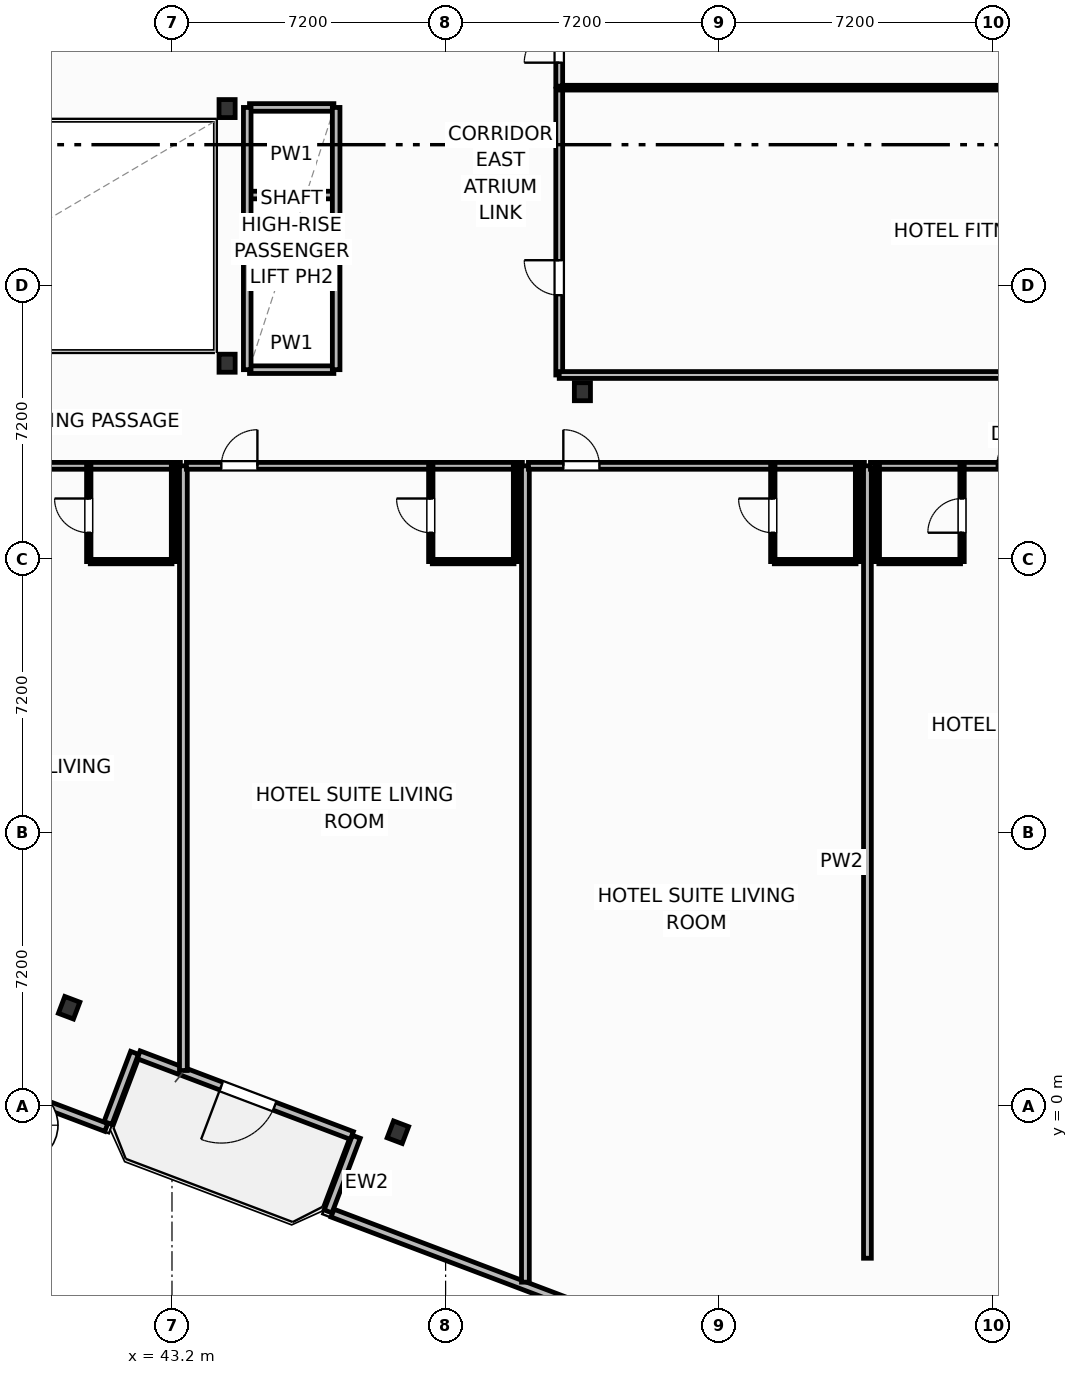
"""IFC4 building model, lengths in metres.
Left out: names, types, materials, properties, quantities, classifications, styles, units other than length and angle.
Written with IfcOpenShell. Run it as: python <this file> out.ifc"""

import sys

from ifc_helpers import new_model, si_unit, direction, frame, frame_2d, origin, origin_2d, place, context, subcontext, project, spatial, rectangle, i_section, extrude, element, fill, save


model = new_model("IFC4")
c1 = context("Model", 3, precision=1e-05, world=origin(), true_north=direction((0.0, 1.0)))
c2 = subcontext(c1, "Body", "Model", "MODEL_VIEW")
j1 = project(units=[si_unit("LENGTHUNIT", "METRE"), si_unit("PLANEANGLEUNIT", "RADIAN")], contexts=[c1])
p1 = place(None, origin())
s1 = spatial("IfcSite", under=j1, at=p1, CompositionType="ELEMENT")
p2 = place(p1, origin())
s2 = spatial("IfcBuilding", under=s1, at=p2, CompositionType="ELEMENT")
p3 = place(p2, frame((0.0, 0.0, 83.6)))
s3 = spatial("IfcBuildingStorey", under=s2, at=p3, CompositionType="ELEMENT", Elevation=83.6)
for number, where, z_axis, x_axis in (
    (1, (44.65, 19.55, 0.0), (0.0, 0.0, 1.0), (1.0, 0.0, 0.0)),
    (2, (44.65, 26.25, 0.0), (0.0, 0.0, 1.0), (1.0, 0.0, 0.0)),
    (3, (54.0, 18.8, 0.0), (0.0, 0.0, 1.0), (1.0, 0.0, 0.0)),
    (4, (40.493, 2.591, 0.0), (0.0, 0.0, 1.0), (0.935, -0.354, 0.0)),
    (5, (49.144, -0.684, 0.0), (0.0, 0.0, 1.0), (0.935, -0.354, 0.0)),
):
    element("IfcColumn", number, at=place(p3, frame(where, z_axis=z_axis, x_axis=x_axis)), inside=s3, PredefinedType="COLUMN", context=c2, shape_type="SweptSolid", body=[
        extrude(i_section(OverallWidth=0.424, OverallDepth=0.474, WebThickness=0.048, FlangeThickness=0.077, FilletRadius=0.025, at=origin_2d()), origin(), (0.0, 0.0, 1.0), 3.7),
    ])
p4 = place(p3, frame((47.935, -0.771, 0.0), z_axis=(0.0, 0.0, 1.0), x_axis=(-0.935227640088, 0.354046976001, 0.0)))
e6 = element("IfcWall", 6, at=p4, inside=s3, PredefinedType="SOLIDWALL", context=c2, shape_type="SweptSolid", body=[
    extrude(rectangle(XDim=6.0, YDim=0.22, at=frame_2d((3.0, 0.0))), origin(), (0.0, 0.0, 1.0), 2.73),
])
p5 = place(p4, frame((2.176, 0.0, 0.0)))
e7 = element("IfcOpeningElement", 7, at=p5, cuts=e6, PredefinedType="OPENING", context=c2, shape_type="SweptSolid", body=[
    extrude(rectangle(XDim=1.5, YDim=2.25, at=frame_2d((0.75, 1.125))), frame((0.0, 0.12, 0.0), z_axis=(0.0, -1.0, 0.0), x_axis=(1.0, 0.0, 0.0)), (0.0, 0.0, 1.0), 0.24),
])
p6 = place(p3, frame((33.957, 2.286, 0.0), z_axis=(0.0, 0.0, 1.0), x_axis=(0.935220736163, -0.354065212427, 0.0)))
e8 = element("IfcWall", 8, at=p6, inside=s3, PredefinedType="SOLIDWALL", context=c2, shape_type="SweptSolid", body=[
    extrude(rectangle(XDim=8.035, YDim=0.22, at=frame_2d((4.018, 0.0))), origin(), (0.0, 0.0, 1.0), 2.73),
])
p7 = place(p6, frame((3.192, 0.0, 0.8)))
e9 = element("IfcOpeningElement", 9, at=p7, cuts=e8, PredefinedType="OPENING", context=c2, shape_type="SweptSolid", body=[
    extrude(rectangle(XDim=1.65, YDim=1.65, at=frame_2d((0.825, 0.825))), frame((0.0, 0.12, 0.0), z_axis=(0.0, -1.0, 0.0), x_axis=(1.0, 0.0, 0.0)), (0.0, 0.0, 1.0), 0.24),
])
p8 = place(p3, frame((41.516, -0.442, 0.0), z_axis=(0.0, 0.0, 1.0), x_axis=(0.354061611705, 0.935222099352, 0.0)))
e10 = element("IfcWall", 10, at=p8, inside=s3, PredefinedType="SOLIDWALL", context=c2, shape_type="SweptSolid", body=[
    extrude(rectangle(XDim=1.975, YDim=0.22, at=frame_2d((0.987, 0.0))), origin(), (0.0, 0.0, 1.0), 2.73),
])
p9 = place(p3, frame((48.051, -0.805, 0.0), z_axis=(0.0, 0.0, 1.0), x_axis=(-0.353988291547, -0.935249854022, 0.0)))
e11 = element("IfcWall", 11, at=p9, inside=s3, PredefinedType="SOLIDWALL", context=c2, shape_type="SweptSolid", body=[
    extrude(rectangle(XDim=2.1, YDim=0.22, at=frame_2d((1.05, 0.0))), origin(), (0.0, 0.0, 1.0), 2.73),
])
p10 = place(p3, frame((47.424, -2.813, 0.0), z_axis=(0.0, 0.0, 1.0), x_axis=(0.935225962032, -0.354051408614, 0.0)))
e12 = element("IfcWall", 12, at=p10, inside=s3, PredefinedType="SOLIDWALL", context=c2, shape_type="SweptSolid", body=[
    extrude(rectangle(XDim=14.347, YDim=0.22, at=frame_2d((7.173, 0.0))), origin(), (0.0, 0.0, 1.0), 2.73),
])
p11 = place(p10, frame((6.348, 0.0, 0.8)))
e13 = element("IfcOpeningElement", 13, at=p11, cuts=e12, PredefinedType="OPENING", context=c2, shape_type="SweptSolid", body=[
    extrude(rectangle(XDim=1.65, YDim=1.65, at=frame_2d((0.825, 0.825))), frame((0.0, 0.12, 0.0), z_axis=(0.0, -1.0, 0.0), x_axis=(1.0, 0.0, 0.0)), (0.0, 0.0, 1.0), 0.24),
])
p12 = place(p3, frame((34.58, 16.85, 0.0), z_axis=(0.0, 0.0, 1.0), x_axis=(1.0, 0.0, 0.0)))
e14 = element("IfcWall", 14, at=p12, inside=s3, PredefinedType="PARTITIONING", context=c2, shape_type="SweptSolid", body=[
    extrude(rectangle(XDim=8.84, YDim=0.18, at=frame_2d((4.42, 0.0))), origin(), (0.0, 0.0, 1.0), 3.45),
])
p13 = place(p12, frame((0.918, 0.0, 0.0)))
e15 = element("IfcOpeningElement", 15, at=p13, cuts=e14, PredefinedType="OPENING", context=c2, shape_type="SweptSolid", body=[
    extrude(rectangle(XDim=0.95, YDim=2.15, at=frame_2d((0.475, 1.075))), frame((0.0, 0.1, 0.0), z_axis=(0.0, -1.0, 0.0), x_axis=(1.0, 0.0, 0.0)), (0.0, 0.0, 1.0), 0.2),
])
p14 = place(p3, frame((41.05, 14.33, 0.0), z_axis=(0.0, 0.0, 1.0), x_axis=(1.0, 0.0, 0.0)))
e16 = element("IfcWall", 16, at=p14, inside=s3, PredefinedType="PARTITIONING", context=c2, shape_type="SweptSolid", body=[
    extrude(rectangle(XDim=2.15, YDim=0.115, at=frame_2d((1.075, 0.0))), origin(), (0.0, 0.0, 1.0), 3.45),
])
p15 = place(p3, frame((41.01, 14.33, 0.0), z_axis=(0.0, 0.0, 1.0), x_axis=(0.0, 1.0, 0.0)))
e17 = element("IfcWall", 17, at=p15, inside=s3, PredefinedType="PARTITIONING", context=c2, shape_type="SweptSolid", body=[
    extrude(rectangle(XDim=2.52, YDim=0.115, at=frame_2d((1.26, 0.0))), origin(), (0.0, 0.0, 1.0), 3.45),
])
p16 = place(p15, frame((0.76, 0.0, 0.0)))
e18 = element("IfcOpeningElement", 18, at=p16, cuts=e17, PredefinedType="OPENING", context=c2, shape_type="SweptSolid", body=[
    extrude(rectangle(XDim=0.9, YDim=2.05, at=frame_2d((0.45, 1.025))), frame((0.0, 0.067, 0.0), z_axis=(0.0, -1.0, 0.0), x_axis=(1.0, 0.0, 0.0)), (0.0, 0.0, 1.0), 0.135),
])
p17 = place(p3, frame((43.24, 14.33, 0.0), z_axis=(0.0, 0.0, 1.0), x_axis=(0.0, 1.0, 0.0)))
e19 = element("IfcWall", 19, at=p17, inside=s3, PredefinedType="PARTITIONING", context=c2, shape_type="SweptSolid", body=[
    extrude(rectangle(XDim=2.52, YDim=0.115, at=frame_2d((1.26, 0.0))), origin(), (0.0, 0.0, 1.0), 2.58),
])
p18 = place(p3, frame((43.5, 0.939, 0.0), z_axis=(0.0, 0.0, 1.0), x_axis=(0.0, 1.0, 0.0)))
e20 = element("IfcWall", 20, at=p18, inside=s3, PredefinedType="PARTITIONING", context=c2, shape_type="SweptSolid", body=[
    extrude(rectangle(XDim=15.911, YDim=0.205, at=frame_2d((7.955, 0.0))), origin(), (0.0, 0.0, 1.0), 2.58),
])
p19 = place(p3, frame((43.58, 16.85, 0.0), z_axis=(0.0, 0.0, 1.0), x_axis=(1.0, 0.0, 0.0)))
e21 = element("IfcWall", 21, at=p19, inside=s3, PredefinedType="PARTITIONING", context=c2, shape_type="SweptSolid", body=[
    extrude(rectangle(XDim=8.84, YDim=0.18, at=frame_2d((4.42, 0.0))), origin(), (0.0, 0.0, 1.0), 3.45),
])
p20 = place(p19, frame((0.918, 0.0, 0.0)))
e22 = element("IfcOpeningElement", 22, at=p20, cuts=e21, PredefinedType="OPENING", context=c2, shape_type="SweptSolid", body=[
    extrude(rectangle(XDim=0.95, YDim=2.15, at=frame_2d((0.475, 1.075))), frame((0.0, 0.1, 0.0), z_axis=(0.0, -1.0, 0.0), x_axis=(1.0, 0.0, 0.0)), (0.0, 0.0, 1.0), 0.2),
])
p21 = place(p3, frame((50.05, 14.33, 0.0), z_axis=(0.0, 0.0, 1.0), x_axis=(1.0, 0.0, 0.0)))
e23 = element("IfcWall", 23, at=p21, inside=s3, PredefinedType="PARTITIONING", context=c2, shape_type="SweptSolid", body=[
    extrude(rectangle(XDim=2.15, YDim=0.115, at=frame_2d((1.075, 0.0))), origin(), (0.0, 0.0, 1.0), 3.45),
])
p22 = place(p3, frame((50.01, 14.33, 0.0), z_axis=(0.0, 0.0, 1.0), x_axis=(0.0, 1.0, 0.0)))
e24 = element("IfcWall", 24, at=p22, inside=s3, PredefinedType="PARTITIONING", context=c2, shape_type="SweptSolid", body=[
    extrude(rectangle(XDim=2.52, YDim=0.115, at=frame_2d((1.26, 0.0))), origin(), (0.0, 0.0, 1.0), 3.45),
])
p23 = place(p22, frame((0.76, 0.0, 0.0)))
e25 = element("IfcOpeningElement", 25, at=p23, cuts=e24, PredefinedType="OPENING", context=c2, shape_type="SweptSolid", body=[
    extrude(rectangle(XDim=0.9, YDim=2.05, at=frame_2d((0.45, 1.025))), frame((0.0, 0.067, 0.0), z_axis=(0.0, -1.0, 0.0), x_axis=(1.0, 0.0, 0.0)), (0.0, 0.0, 1.0), 0.135),
])
p24 = place(p3, frame((52.24, 14.33, 0.0), z_axis=(0.0, 0.0, 1.0), x_axis=(0.0, 1.0, 0.0)))
e26 = element("IfcWall", 26, at=p24, inside=s3, PredefinedType="PARTITIONING", context=c2, shape_type="SweptSolid", body=[
    extrude(rectangle(XDim=2.52, YDim=0.115, at=frame_2d((1.26, 0.0))), origin(), (0.0, 0.0, 1.0), 3.45),
])
p25 = place(p3, frame((52.5, -4.63, 0.0), z_axis=(0.0, 0.0, 1.0), x_axis=(0.0, 1.0, 0.0)))
e27 = element("IfcWall", 27, at=p25, inside=s3, PredefinedType="PARTITIONING", context=c2, shape_type="SweptSolid", body=[
    extrude(rectangle(XDim=21.48, YDim=0.205, at=frame_2d((10.74, 0.0))), origin(), (0.0, 0.0, 1.0), 2.58),
])
p26 = place(p3, frame((52.58, 16.85, 0.0), z_axis=(0.0, 0.0, 1.0), x_axis=(1.0, 0.0, 0.0)))
e28 = element("IfcWall", 28, at=p26, inside=s3, PredefinedType="PARTITIONING", context=c2, shape_type="SweptSolid", body=[
    extrude(rectangle(XDim=8.84, YDim=0.18, at=frame_2d((4.42, 0.0))), origin(), (0.0, 0.0, 1.0), 2.58),
])
p27 = place(p26, frame((0.918, 0.0, 0.0)))
e29 = element("IfcOpeningElement", 29, at=p27, cuts=e28, PredefinedType="OPENING", context=c2, shape_type="SweptSolid", body=[
    extrude(rectangle(XDim=0.95, YDim=2.15, at=frame_2d((0.475, 1.075))), frame((0.0, 0.1, 0.0), z_axis=(0.0, -1.0, 0.0), x_axis=(1.0, 0.0, 0.0)), (0.0, 0.0, 1.0), 0.2),
])
p28 = place(p3, frame((59.05, 14.33, 0.0), z_axis=(0.0, 0.0, 1.0), x_axis=(1.0, 0.0, 0.0)))
e30 = element("IfcWall", 30, at=p28, inside=s3, PredefinedType="PARTITIONING", context=c2, shape_type="SweptSolid", body=[
    extrude(rectangle(XDim=2.15, YDim=0.115, at=frame_2d((1.075, 0.0))), origin(), (0.0, 0.0, 1.0), 3.45),
])
p29 = place(p3, frame((59.01, 14.33, 0.0), z_axis=(0.0, 0.0, 1.0), x_axis=(0.0, 1.0, 0.0)))
e31 = element("IfcWall", 31, at=p29, inside=s3, PredefinedType="PARTITIONING", context=c2, shape_type="SweptSolid", body=[
    extrude(rectangle(XDim=2.52, YDim=0.115, at=frame_2d((1.26, 0.0))), origin(), (0.0, 0.0, 1.0), 3.45),
])
p30 = place(p29, frame((0.76, 0.0, 0.0)))
e32 = element("IfcOpeningElement", 32, at=p30, cuts=e31, PredefinedType="OPENING", context=c2, shape_type="SweptSolid", body=[
    extrude(rectangle(XDim=0.9, YDim=2.05, at=frame_2d((0.45, 1.025))), frame((0.0, 0.067, 0.0), z_axis=(0.0, -1.0, 0.0), x_axis=(1.0, 0.0, 0.0)), (0.0, 0.0, 1.0), 0.135),
])
p31 = place(p3, frame((61.24, 14.33, 0.0), z_axis=(0.0, 0.0, 1.0), x_axis=(0.0, 1.0, 0.0)))
e33 = element("IfcWall", 33, at=p31, inside=s3, PredefinedType="PARTITIONING", context=c2, shape_type="SweptSolid", body=[
    extrude(rectangle(XDim=2.52, YDim=0.115, at=frame_2d((1.26, 0.0))), origin(), (0.0, 0.0, 1.0), 3.45),
])
p32 = place(p3, frame((61.5, -4.0, 0.0), z_axis=(0.0, 0.0, 1.0), x_axis=(0.0, 1.0, 0.0)))
e34 = element("IfcWall", 34, at=p32, inside=s3, PredefinedType="PARTITIONING", context=c2, shape_type="SweptSolid", body=[
    extrude(rectangle(XDim=20.85, YDim=0.205, at=frame_2d((10.425, 0.0))), origin(), (0.0, 0.0, 1.0), 3.45),
])
p33 = place(p3, frame((61.58, 16.85, 0.0), z_axis=(0.0, 0.0, 1.0), x_axis=(1.0, 0.0, 0.0)))
e35 = element("IfcWall", 35, at=p33, inside=s3, PredefinedType="PARTITIONING", context=c2, shape_type="SweptSolid", body=[
    extrude(rectangle(XDim=14.222, YDim=0.18, at=frame_2d((7.111, 0.0))), origin(), (0.0, 0.0, 1.0), 3.45),
])
p34 = place(p33, frame((3.325, 0.0, 0.0)))
e36 = element("IfcOpeningElement", 36, at=p34, cuts=e35, PredefinedType="OPENING", context=c2, shape_type="SweptSolid", body=[
    extrude(rectangle(XDim=0.95, YDim=2.15, at=frame_2d((0.475, 1.075))), frame((0.0, 0.1, 0.0), z_axis=(0.0, -1.0, 0.0), x_axis=(1.0, 0.0, 0.0)), (0.0, 0.0, 1.0), 0.2),
])
p35 = place(p3, frame((61.8, 14.33, 0.0), z_axis=(0.0, 0.0, 1.0), x_axis=(1.0, 0.0, 0.0)))
e37 = element("IfcWall", 37, at=p35, inside=s3, PredefinedType="PARTITIONING", context=c2, shape_type="SweptSolid", body=[
    extrude(rectangle(XDim=2.15, YDim=0.115, at=frame_2d((1.075, 0.0))), origin(), (0.0, 0.0, 1.0), 3.45),
])
p36 = place(p3, frame((63.99, 14.33, 0.0), z_axis=(0.0, 0.0, 1.0), x_axis=(0.0, 1.0, 0.0)))
e38 = element("IfcWall", 38, at=p36, inside=s3, PredefinedType="PARTITIONING", context=c2, shape_type="SweptSolid", body=[
    extrude(rectangle(XDim=2.52, YDim=0.115, at=frame_2d((1.26, 0.0))), origin(), (0.0, 0.0, 1.0), 3.45),
])
p37 = place(p36, frame((0.76, 0.0, 0.0)))
e39 = element("IfcOpeningElement", 39, at=p37, cuts=e38, PredefinedType="OPENING", context=c2, shape_type="SweptSolid", body=[
    extrude(rectangle(XDim=0.9, YDim=2.05, at=frame_2d((0.45, 1.025))), frame((0.0, 0.067, 0.0), z_axis=(0.0, -1.0, 0.0), x_axis=(1.0, 0.0, 0.0)), (0.0, 0.0, 1.0), 0.135),
])
p38 = place(p3, frame((61.76, 14.33, 0.0), z_axis=(0.0, 0.0, 1.0), x_axis=(0.0, 1.0, 0.0)))
e40 = element("IfcWall", 40, at=p38, inside=s3, PredefinedType="PARTITIONING", context=c2, shape_type="SweptSolid", body=[
    extrude(rectangle(XDim=2.52, YDim=0.115, at=frame_2d((1.26, 0.0))), origin(), (0.0, 0.0, 1.0), 3.45),
])
p39 = place(p3, frame((53.39, 19.24, 0.0), z_axis=(0.0, 0.0, 1.0), x_axis=(0.0, 1.0, 0.0)))
e41 = element("IfcWall", 41, at=p39, inside=s3, PredefinedType="PARTITIONING", context=c2, shape_type="SweptSolid", body=[
    extrude(rectangle(XDim=7.52, YDim=0.18, at=frame_2d((3.76, 0.0))), origin(), (0.0, 0.0, 1.0), 3.45),
])
p40 = place(p39, frame((2.1, 0.0, 0.0)))
e42 = element("IfcOpeningElement", 42, at=p40, cuts=e41, PredefinedType="OPENING", context=c2, shape_type="SweptSolid", body=[
    extrude(rectangle(XDim=0.92, YDim=2.05, at=frame_2d((0.46, 1.025))), frame((0.0, 0.1, 0.0), z_axis=(0.0, -1.0, 0.0), x_axis=(1.0, 0.0, 0.0)), (0.0, 0.0, 1.0), 0.2),
])
p41 = place(p3, frame((53.39, 26.8, 0.0), z_axis=(0.0, 0.0, 1.0), x_axis=(1.0, 0.0, 0.0)))
e43 = element("IfcWall", 43, at=p41, inside=s3, PredefinedType="PARTITIONING", context=c2, shape_type="SweptSolid", body=[
    extrude(rectangle(XDim=23.61, YDim=0.125, at=frame_2d((11.805, 0.0))), origin(), (0.0, 0.0, 1.0), 3.45),
])
p42 = place(p3, frame((53.39, 19.24, 0.0), z_axis=(0.0, 0.0, 1.0), x_axis=(1.0, 0.0, 0.0)))
e44 = element("IfcWall", 44, at=p42, inside=s3, PredefinedType="PARTITIONING", context=c2, shape_type="SweptSolid", body=[
    extrude(rectangle(XDim=23.317, YDim=0.18, at=frame_2d((11.658, 0.0))), origin(), (0.0, 0.0, 1.0), 3.45),
])
p43 = place(p3, frame((53.39, 26.84, 0.0), z_axis=(0.0, 0.0, 1.0), x_axis=(0.0, 1.0, 0.0)))
e45 = element("IfcWall", 45, at=p43, inside=s3, PredefinedType="PARTITIONING", context=c2, shape_type="SweptSolid", body=[
    extrude(rectangle(XDim=12.46, YDim=0.18, at=frame_2d((6.23, 0.0))), origin(), (0.0, 0.0, 1.0), 3.45),
])
p44 = place(p43, frame((0.618, 0.0, 0.0)))
e46 = element("IfcOpeningElement", 46, at=p44, cuts=e45, PredefinedType="OPENING", context=c2, shape_type="SweptSolid", body=[
    extrude(rectangle(XDim=0.92, YDim=2.05, at=frame_2d((0.46, 1.025))), frame((0.0, 0.1, 0.0), z_axis=(0.0, -1.0, 0.0), x_axis=(1.0, 0.0, 0.0)), (0.0, 0.0, 1.0), 0.2),
])
for number, where, z_axis, x_axis in (
    (47, (45.24, 21.675, 0.0), (0.0, 0.0, 1.0), (1.0, 0.0, 0.0)),
    (48, (45.24, 23.975, 0.0), (0.0, 0.0, 1.0), (1.0, 0.0, 0.0)),
):
    element("IfcWall", number, at=place(p3, frame(where, z_axis=z_axis, x_axis=x_axis)), inside=s3, PredefinedType="PARTITIONING", context=c2, shape_type="SweptSolid", body=[
        extrude(rectangle(XDim=2.22, YDim=0.2, at=frame_2d((1.11, 0.0))), origin(), (0.0, 0.0, 1.0), 3.45),
    ])
p45 = place(p3, frame((45.24, 19.38, 0.0), z_axis=(0.0, 0.0, 1.0), x_axis=(1.0, 0.0, 0.0)))
e49 = element("IfcWall", 49, at=p45, inside=s3, PredefinedType="PARTITIONING", context=c2, shape_type="SweptSolid", body=[
    extrude(rectangle(XDim=2.22, YDim=0.2, at=frame_2d((1.11, 0.0))), origin(), (0.0, 0.0, 1.0), 2.662),
])
p46 = place(p3, frame((45.24, 26.28, 0.0), z_axis=(0.0, 0.0, 1.0), x_axis=(1.0, 0.0, 0.0)))
e50 = element("IfcWall", 50, at=p46, inside=s3, PredefinedType="PARTITIONING", context=c2, shape_type="SweptSolid", body=[
    extrude(rectangle(XDim=2.22, YDim=0.2, at=frame_2d((1.11, 0.0))), origin(), (0.0, 0.0, 1.0), 3.45),
])
for number, where, z_axis, x_axis in (
    (51, (45.18, 19.38, 0.0), (0.0, 0.0, 1.0), (0.0, 1.0, 0.0)),
    (52, (47.52, 19.38, 0.0), (0.0, 0.0, 1.0), (0.0, 1.0, 0.0)),
):
    element("IfcWall", number, at=place(p3, frame(where, z_axis=z_axis, x_axis=x_axis)), inside=s3, PredefinedType="PARTITIONING", context=c2, shape_type="SweptSolid", body=[
        extrude(rectangle(XDim=6.9, YDim=0.2, at=frame_2d((3.45, 0.0))), origin(), (0.0, 0.0, 1.0), 3.45),
    ])
p47 = place(p5, origin())
e53 = element("IfcDoor", 53, at=p47, inside=s3, OperationType="SINGLE_SWING_RIGHT", PredefinedType="DOOR", context=c2, shape_type="SweptSolid", body=[
    extrude(rectangle(XDim=1.5, YDim=2.25, at=frame_2d((0.75, 1.125))), frame((0.0, 0.025, 0.0), z_axis=(0.0, -1.0, 0.0), x_axis=(1.0, 0.0, 0.0)), (0.0, 0.0, 1.0), 0.05),
])
fill(e7, e53)
p48 = place(p16, origin())
e54 = element("IfcDoor", 54, at=p48, inside=s3, OperationType="SINGLE_SWING_RIGHT", PredefinedType="DOOR", context=c2, shape_type="SweptSolid", body=[
    extrude(rectangle(XDim=0.9, YDim=2.05, at=frame_2d((0.45, 1.025))), frame((0.0, 0.025, 0.0), z_axis=(0.0, -1.0, 0.0), x_axis=(1.0, 0.0, 0.0)), (0.0, 0.0, 1.0), 0.05),
])
fill(e18, e54)
p49 = place(p20, origin())
e55 = element("IfcDoor", 55, at=p49, inside=s3, OperationType="SINGLE_SWING_RIGHT", PredefinedType="DOOR", context=c2, shape_type="SweptSolid", body=[
    extrude(rectangle(XDim=0.95, YDim=2.15, at=frame_2d((0.475, 1.075))), frame((0.0, 0.025, 0.0), z_axis=(0.0, -1.0, 0.0), x_axis=(1.0, 0.0, 0.0)), (0.0, 0.0, 1.0), 0.05),
])
fill(e22, e55)
p50 = place(p23, origin())
e56 = element("IfcDoor", 56, at=p50, inside=s3, OperationType="SINGLE_SWING_RIGHT", PredefinedType="DOOR", context=c2, shape_type="SweptSolid", body=[
    extrude(rectangle(XDim=0.9, YDim=2.05, at=frame_2d((0.45, 1.025))), frame((0.0, 0.025, 0.0), z_axis=(0.0, -1.0, 0.0), x_axis=(1.0, 0.0, 0.0)), (0.0, 0.0, 1.0), 0.05),
])
fill(e25, e56)
p51 = place(p27, origin())
e57 = element("IfcDoor", 57, at=p51, inside=s3, OperationType="SINGLE_SWING_LEFT", PredefinedType="DOOR", context=c2, shape_type="SweptSolid", body=[
    extrude(rectangle(XDim=0.95, YDim=2.15, at=frame_2d((0.475, 1.075))), frame((0.0, 0.025, 0.0), z_axis=(0.0, -1.0, 0.0), x_axis=(1.0, 0.0, 0.0)), (0.0, 0.0, 1.0), 0.05),
])
fill(e29, e57)
p52 = place(p30, origin())
e58 = element("IfcDoor", 58, at=p52, inside=s3, OperationType="SINGLE_SWING_RIGHT", PredefinedType="DOOR", context=c2, shape_type="SweptSolid", body=[
    extrude(rectangle(XDim=0.9, YDim=2.05, at=frame_2d((0.45, 1.025))), frame((0.0, 0.025, 0.0), z_axis=(0.0, -1.0, 0.0), x_axis=(1.0, 0.0, 0.0)), (0.0, 0.0, 1.0), 0.05),
])
fill(e32, e58)
p53 = place(p34, origin())
e59 = element("IfcDoor", 59, at=p53, inside=s3, OperationType="SINGLE_SWING_RIGHT", PredefinedType="DOOR", context=c2, shape_type="SweptSolid", body=[
    extrude(rectangle(XDim=0.95, YDim=2.15, at=frame_2d((0.475, 1.075))), frame((0.0, 0.025, 0.0), z_axis=(0.0, -1.0, 0.0), x_axis=(1.0, 0.0, 0.0)), (0.0, 0.0, 1.0), 0.05),
])
fill(e36, e59)
p54 = place(p37, origin())
e60 = element("IfcDoor", 60, at=p54, inside=s3, OperationType="SINGLE_SWING_LEFT", PredefinedType="DOOR", context=c2, shape_type="SweptSolid", body=[
    extrude(rectangle(XDim=0.9, YDim=2.05, at=frame_2d((0.45, 1.025))), frame((0.0, 0.025, 0.0), z_axis=(0.0, -1.0, 0.0), x_axis=(1.0, 0.0, 0.0)), (0.0, 0.0, 1.0), 0.05),
])
fill(e39, e60)
p55 = place(p40, origin())
e61 = element("IfcDoor", 61, at=p55, inside=s3, OperationType="SINGLE_SWING_RIGHT", PredefinedType="DOOR", context=c2, shape_type="SweptSolid", body=[
    extrude(rectangle(XDim=0.92, YDim=2.05, at=frame_2d((0.46, 1.025))), frame((0.0, 0.025, 0.0), z_axis=(0.0, -1.0, 0.0), x_axis=(1.0, 0.0, 0.0)), (0.0, 0.0, 1.0), 0.05),
])
fill(e42, e61)
p56 = place(p44, origin())
e62 = element("IfcDoor", 62, at=p56, inside=s3, OperationType="SINGLE_SWING_LEFT", PredefinedType="DOOR", context=c2, shape_type="SweptSolid", body=[
    extrude(rectangle(XDim=0.92, YDim=2.05, at=frame_2d((0.46, 1.025))), frame((0.0, 0.025, 0.0), z_axis=(0.0, -1.0, 0.0), x_axis=(1.0, 0.0, 0.0)), (0.0, 0.0, 1.0), 0.05),
])
fill(e46, e62)
save(model, sys.argv[1])
